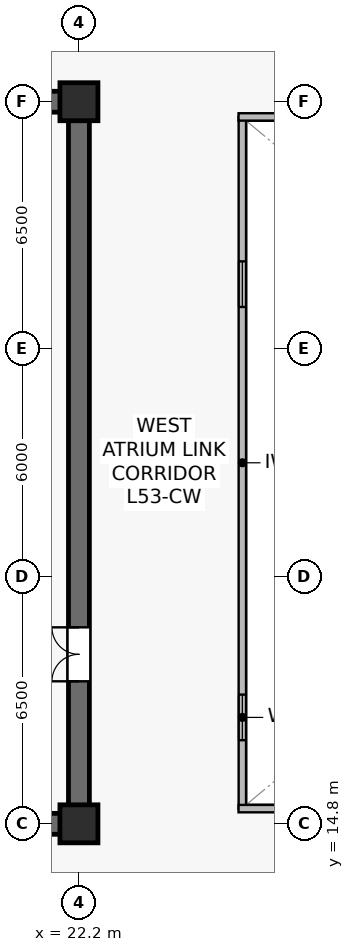
"""IFC4 building model, lengths in metres.
Left out: names, types, materials, properties, quantities, classifications, styles, units other than length and angle.
Written with IfcOpenShell. Run it as: python <this file> out.ifc"""

import sys

from ifc_helpers import new_model, si_unit, direction, frame, frame_2d, origin, origin_2d, place, context, subcontext, project, spatial, rectangle, extrude, source, transform, mapped, element, fill, save


model = new_model("IFC4")
c1 = context("Model", 3, precision=1e-05, world=origin(), true_north=direction((0.0, 1.0)))
c2 = subcontext(c1, "Body", "Model", "MODEL_VIEW")
j1 = project(units=[si_unit("LENGTHUNIT", "METRE"), si_unit("PLANEANGLEUNIT", "RADIAN")], contexts=[c1])
p1 = place(None, origin())
s1 = spatial("IfcSite", under=j1, at=p1, CompositionType="ELEMENT")
p2 = place(p1, origin())
s2 = spatial("IfcBuilding", under=s1, at=p2, CompositionType="ELEMENT")
p3 = place(p2, frame((0.0, 0.0, 221.9)))
s3 = spatial("IfcBuildingStorey", under=s2, at=p3, CompositionType="ELEMENT", Elevation=221.9)
p4 = place(p3, frame((7.125, 14.8, 0.0), z_axis=(0.0, 0.0, 1.0), x_axis=(1.0, 0.0, 0.0)))
e1 = element("IfcWall", 1, at=p4, inside=s3, PredefinedType="SHEAR", context=c2, shape_type="SweptSolid", body=[
    extrude(rectangle(XDim=15.35, YDim=0.55, at=frame_2d((7.675, 0.0))), origin(), (0.0, 0.0, 1.0), 3.8),
])
p5 = place(p3, frame((7.125, 33.8, 0.0), z_axis=(0.0, 0.0, 1.0), x_axis=(1.0, 0.0, 0.0)))
e2 = element("IfcWall", 2, at=p5, inside=s3, PredefinedType="SHEAR", context=c2, shape_type="SweptSolid", body=[
    extrude(rectangle(XDim=15.35, YDim=0.55, at=frame_2d((7.675, 0.0))), origin(), (0.0, 0.0, 1.0), 3.8),
])
p6 = place(p5, frame((5.625, 0.0, 0.0)))
e3 = element("IfcOpeningElement", 3, at=p6, cuts=e2, PredefinedType="OPENING", context=c2, shape_type="SweptSolid", body=[
    extrude(rectangle(XDim=0.95, YDim=2.15, at=frame_2d((0.475, 1.075))), frame((0.0, 0.285, 0.0), z_axis=(0.0, -1.0, 0.0), x_axis=(1.0, 0.0, 0.0)), (0.0, 0.0, 1.0), 0.57),
])
p7 = place(p5, frame((8.99, 0.0, 0.0)))
e4 = element("IfcOpeningElement", 4, at=p7, cuts=e2, PredefinedType="OPENING", context=c2, shape_type="SweptSolid", body=[
    extrude(rectangle(XDim=0.95, YDim=2.15, at=frame_2d((0.475, 1.075))), frame((0.0, 0.285, 0.0), z_axis=(0.0, -1.0, 0.0), x_axis=(1.0, 0.0, 0.0)), (0.0, 0.0, 1.0), 0.57),
])
p8 = place(p5, frame((12.39, 0.0, 0.0)))
e5 = element("IfcOpeningElement", 5, at=p8, cuts=e2, PredefinedType="OPENING", context=c2, shape_type="SweptSolid", body=[
    extrude(rectangle(XDim=0.95, YDim=2.15, at=frame_2d((0.475, 1.075))), frame((0.0, 0.285, 0.0), z_axis=(0.0, -1.0, 0.0), x_axis=(1.0, 0.0, 0.0)), (0.0, 0.0, 1.0), 0.57),
])
p9 = place(p3, frame((22.2, 15.075, 0.0), z_axis=(0.0, 0.0, 1.0), x_axis=(0.0, 1.0, 0.0)))
e6 = element("IfcWall", 6, at=p9, inside=s3, PredefinedType="SHEAR", context=c2, shape_type="SweptSolid", body=[
    extrude(rectangle(XDim=18.45, YDim=0.55, at=frame_2d((9.225, 0.0))), origin(), (0.0, 0.0, 1.0), 3.8),
])
p10 = place(p9, frame((3.475, 0.0, 0.0)))
e7 = element("IfcOpeningElement", 7, at=p10, cuts=e6, PredefinedType="OPENING", context=c2, shape_type="SweptSolid", body=[
    extrude(rectangle(XDim=1.42, YDim=2.2, at=frame_2d((0.71, 1.1))), frame((0.0, 0.285, 0.0), z_axis=(0.0, -1.0, 0.0), x_axis=(1.0, 0.0, 0.0)), (0.0, 0.0, 1.0), 0.57),
])
m1 = source(origin(), c2, "Body", "SweptSolid", [
    extrude(rectangle(XDim=1.0, YDim=1.0, at=origin_2d()), origin(), (0.0, 0.0, 1.0), 4.1),
])
for number, where, z_axis, x_axis in (
    (8, (22.2, 14.8, 0.0), (0.0, 0.0, 1.0), (1.0, 0.0, 0.0)),
    (9, (22.2, 33.8, 0.0), (0.0, 0.0, 1.0), (1.0, 0.0, 0.0)),
):
    element("IfcColumn", number, at=place(p3, frame(where, z_axis=z_axis, x_axis=x_axis)), inside=s3, PredefinedType="COLUMN", context=c2, shape_type="MappedRepresentation", body=[
        mapped(m1, transform((0.0, 0.0, 0.0), scale=1.0)),
    ])
p11 = place(p3, frame((26.5, 15.2, 0.0), z_axis=(0.0, 0.0, 1.0), x_axis=(0.0, 1.0, 0.0)))
e10 = element("IfcWall", 10, at=p11, inside=s3, PredefinedType="SOLIDWALL", context=c2, shape_type="SweptSolid", body=[
    extrude(rectangle(XDim=18.2, YDim=0.195, at=frame_2d((9.1, 0.0))), origin(), (0.0, 0.0, 1.0), 3.8),
])
p12 = place(p11, frame((1.8, 0.0, 0.9)))
e11 = element("IfcOpeningElement", 11, at=p12, cuts=e10, PredefinedType="OPENING", context=c2, shape_type="SweptSolid", body=[
    extrude(rectangle(XDim=1.2, YDim=1.35, at=frame_2d((0.6, 0.675))), frame((0.0, 0.107, 0.0), z_axis=(0.0, -1.0, 0.0), x_axis=(1.0, 0.0, 0.0)), (0.0, 0.0, 1.0), 0.215),
])
p13 = place(p11, frame((13.2, 0.0, 0.9)))
e12 = element("IfcOpeningElement", 12, at=p13, cuts=e10, PredefinedType="OPENING", context=c2, shape_type="SweptSolid", body=[
    extrude(rectangle(XDim=1.2, YDim=1.35, at=frame_2d((0.6, 0.675))), frame((0.0, 0.107, 0.0), z_axis=(0.0, -1.0, 0.0), x_axis=(1.0, 0.0, 0.0)), (0.0, 0.0, 1.0), 0.215),
])
for number, where, z_axis, x_axis in (
    (13, (26.4, 15.2, 0.0), (0.0, 0.0, 1.0), (1.0, 0.0, 0.0)),
    (14, (26.4, 33.4, 0.0), (0.0, 0.0, 1.0), (1.0, 0.0, 0.0)),
):
    element("IfcWall", number, at=place(p3, frame(where, z_axis=z_axis, x_axis=x_axis)), inside=s3, PredefinedType="SOLIDWALL", context=c2, shape_type="SweptSolid", body=[
        extrude(rectangle(XDim=22.0, YDim=0.195, at=frame_2d((11.0, 0.0))), origin(), (0.0, 0.0, 1.0), 3.8),
    ])
m2 = source(origin(), c2, "Body", "SweptSolid", [
    extrude(rectangle(XDim=1.2, YDim=1.35, at=frame_2d((0.6, 0.675))), frame((0.0, 0.03, 0.0), z_axis=(0.0, -1.0, 0.0), x_axis=(1.0, 0.0, 0.0)), (0.0, 0.0, 1.0), 0.06),
])
p14 = place(p12, origin())
e15 = element("IfcWindow", 15, at=p14, inside=s3, PartitioningType="SINGLE_PANEL", PredefinedType="WINDOW", context=c2, shape_type="MappedRepresentation", body=[
    mapped(m2, transform((0.0, 0.0, 0.0), scale=1.0)),
])
fill(e11, e15)
p15 = place(p13, origin())
e16 = element("IfcWindow", 16, at=p15, inside=s3, PartitioningType="SINGLE_PANEL", PredefinedType="WINDOW", context=c2, shape_type="MappedRepresentation", body=[
    mapped(m2, transform((0.0, 0.0, 0.0), scale=1.0)),
])
fill(e12, e16)
m3 = source(origin(), c2, "Body", "SweptSolid", [
    extrude(rectangle(XDim=1.42, YDim=2.2, at=frame_2d((0.71, 1.1))), frame((0.0, 0.025, 0.0), z_axis=(0.0, -1.0, 0.0), x_axis=(1.0, 0.0, 0.0)), (0.0, 0.0, 1.0), 0.05),
])
p16 = place(p10, origin())
e17 = element("IfcDoor", 17, at=p16, inside=s3, OperationType="DOUBLE_DOOR_SINGLE_SWING", PredefinedType="DOOR", context=c2, shape_type="MappedRepresentation", body=[
    mapped(m3, transform((0.0, 0.0, 0.0), scale=1.0)),
])
fill(e7, e17)
save(model, sys.argv[1])
